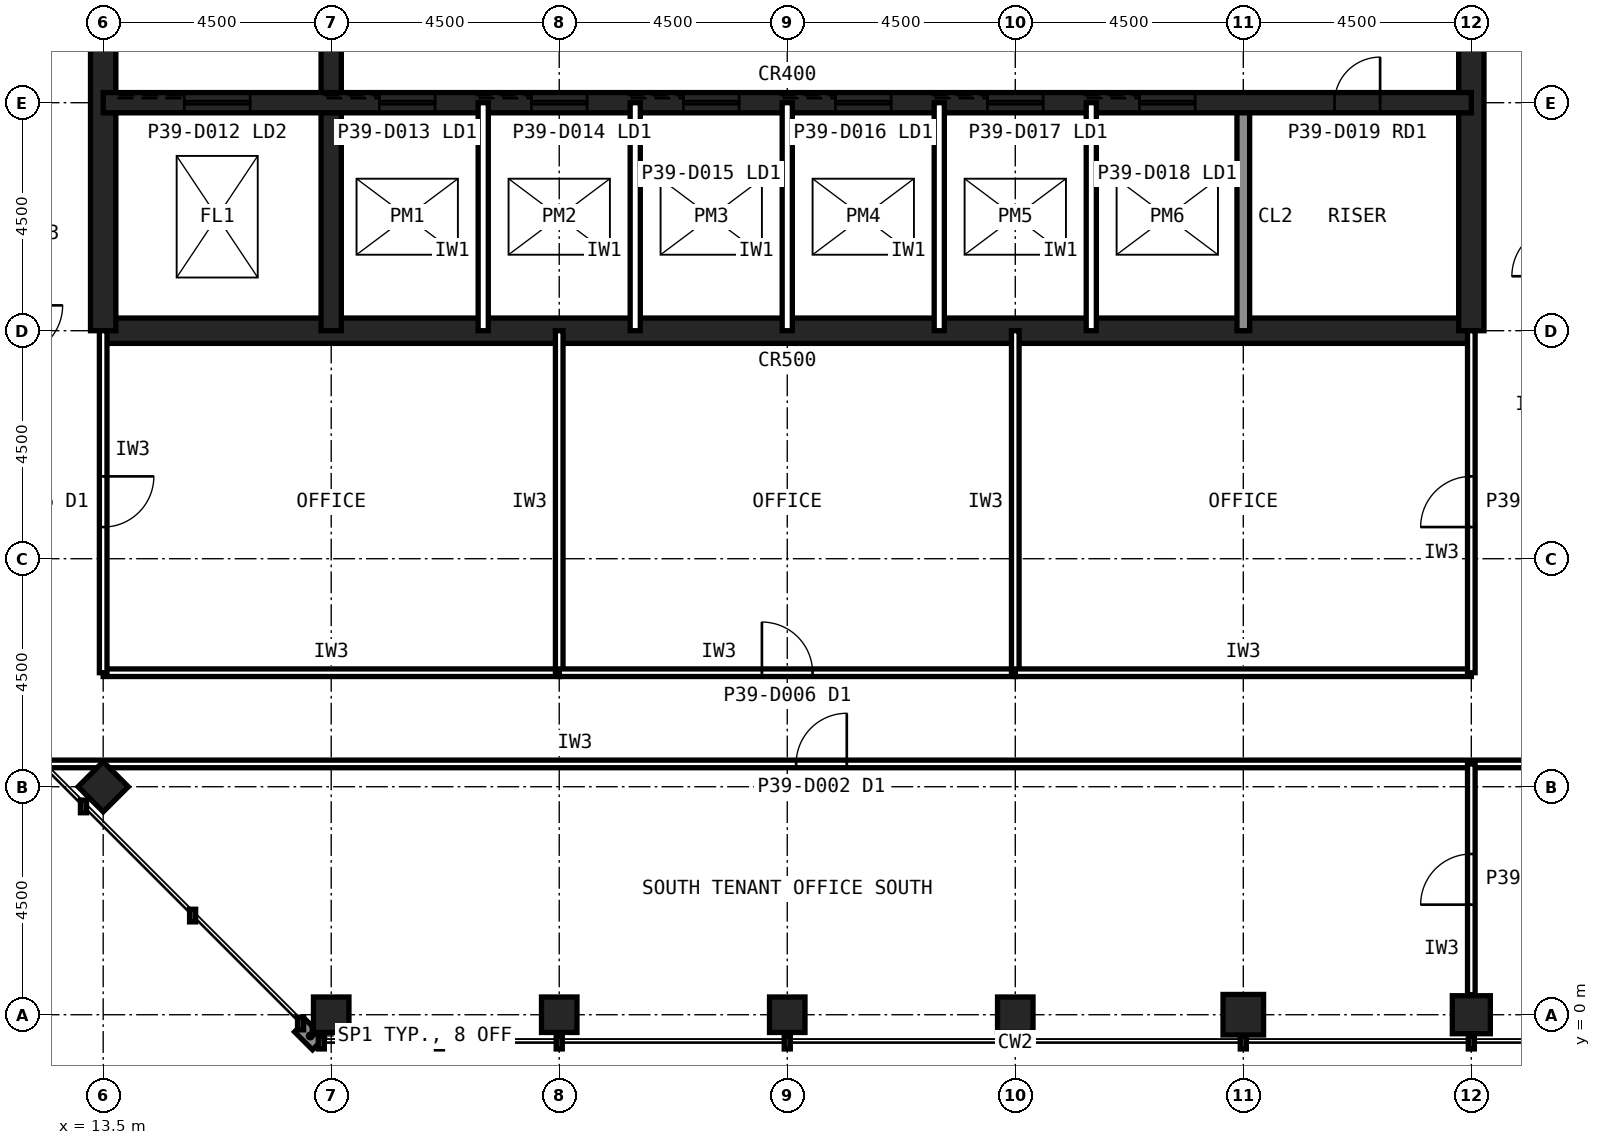
"""IFC4 building model, lengths in metres.
Left out: names, types, materials, properties, quantities, classifications, styles, units other than length and angle.
Written with IfcOpenShell. Run it as: python <this file> out.ifc"""

import sys

from ifc_helpers import new_model, si_unit, direction, frame, frame_2d, origin, origin_2d, place, context, subcontext, project, spatial, rectangle, hollow_rectangle, extrude, element, fill, save


model = new_model("IFC4")
c1 = context("Model", 3, precision=1e-05, world=origin(), true_north=direction((0.0, 1.0)))
c2 = subcontext(c1, "Body", "Model", "MODEL_VIEW")
j1 = project(units=[si_unit("LENGTHUNIT", "METRE"), si_unit("PLANEANGLEUNIT", "RADIAN")], contexts=[c1])
p1 = place(None, origin())
s1 = spatial("IfcSite", under=j1, at=p1, CompositionType="ELEMENT")
p2 = place(p1, origin())
s2 = spatial("IfcBuilding", under=s1, at=p2, CompositionType="ELEMENT")
p3 = place(p2, frame((0.0, 0.0, 167.6)))
s3 = spatial("IfcBuildingStorey", under=s2, at=p3, CompositionType="ELEMENT", Elevation=167.6)
for number, where, z_axis, x_axis in (
    (1, (18.0, 0.0, 0.0), (0.0, 0.0, 1.0), (1.0, 0.0, 0.0)),
    (2, (22.5, 0.0, 0.0), (0.0, 0.0, 1.0), (1.0, 0.0, 0.0)),
    (3, (27.0, 0.0, 0.0), (0.0, 0.0, 1.0), (1.0, 0.0, 0.0)),
    (4, (31.5, 0.0, 0.0), (0.0, 0.0, 1.0), (1.0, 0.0, 0.0)),
):
    element("IfcColumn", number, at=place(p3, frame(where, z_axis=z_axis, x_axis=x_axis)), inside=s3, PredefinedType="COLUMN", context=c2, shape_type="SweptSolid", body=[
        extrude(hollow_rectangle(XDim=0.7, YDim=0.7, WallThickness=0.036, at=origin_2d()), origin(), (0.0, 0.0, 1.0), 4.0),
    ])
p4 = place(p3, frame((36.0, 0.0, 0.0), z_axis=(0.0, 0.0, 1.0), x_axis=(1.0, 0.0, 0.0)))
e5 = element("IfcColumn", 5, at=p4, inside=s3, PredefinedType="COLUMN", context=c2, shape_type="SweptSolid", body=[
    extrude(hollow_rectangle(XDim=0.8, YDim=0.8, WallThickness=0.045, at=origin_2d()), origin(), (0.0, 0.0, 1.0), 4.0),
])
p5 = place(p3, frame((40.5, 0.0, 0.0), z_axis=(0.0, 0.0, 1.0), x_axis=(1.0, 0.0, 0.0)))
e6 = element("IfcColumn", 6, at=p5, inside=s3, PredefinedType="COLUMN", context=c2, shape_type="SweptSolid", body=[
    extrude(hollow_rectangle(XDim=0.75, YDim=0.75, WallThickness=0.04, at=origin_2d()), origin(), (0.0, 0.0, 1.0), 4.0),
])
p6 = place(p3, frame((13.5, 4.5, 0.0), z_axis=(0.0, 0.0, 1.0), x_axis=(0.707106781187, 0.707106781187, 0.0)))
e7 = element("IfcColumn", 7, at=p6, inside=s3, PredefinedType="COLUMN", context=c2, shape_type="SweptSolid", body=[
    extrude(hollow_rectangle(XDim=0.7, YDim=0.7, WallThickness=0.036, at=origin_2d()), origin(), (0.0, 0.0, 1.0), 4.0),
])
p7 = place(p3, frame((13.5, 13.5, 0.0), z_axis=(0.0, 0.0, 1.0), x_axis=(1.0, 0.0, 0.0)))
e8 = element("IfcWall", 8, at=p7, inside=s3, PredefinedType="SHEAR", context=c2, shape_type="SweptSolid", body=[
    extrude(rectangle(XDim=27.0, YDim=0.5, at=frame_2d((13.5, 0.0))), origin(), (0.0, 0.0, 1.0), 4.0),
])
p8 = place(p3, frame((40.5, 13.5, 0.0), z_axis=(0.0, 0.0, 1.0), x_axis=(0.0, 1.0, 0.0)))
e9 = element("IfcWall", 9, at=p8, inside=s3, PredefinedType="SHEAR", context=c2, shape_type="SweptSolid", body=[
    extrude(rectangle(XDim=27.0, YDim=0.5, at=frame_2d((13.5, 0.0))), origin(), (0.0, 0.0, 1.0), 4.0),
])
p9 = place(p8, frame((5.85, 0.0, 0.0)))
e10 = element("IfcOpeningElement", 10, at=p9, cuts=e9, PredefinedType="OPENING", context=c2, shape_type="SweptSolid", body=[
    extrude(rectangle(XDim=1.8, YDim=2.1, at=frame_2d((0.9, 1.05))), frame((0.0, 0.26, 0.0), z_axis=(0.0, -1.0, 0.0), x_axis=(1.0, 0.0, 0.0)), (0.0, 0.0, 1.0), 0.52),
])
p10 = place(p8, frame((19.65, 0.0, 0.0)))
e11 = element("IfcOpeningElement", 11, at=p10, cuts=e9, PredefinedType="OPENING", context=c2, shape_type="SweptSolid", body=[
    extrude(rectangle(XDim=1.2, YDim=2.1, at=frame_2d((0.6, 1.05))), frame((0.0, 0.26, 0.0), z_axis=(0.0, -1.0, 0.0), x_axis=(1.0, 0.0, 0.0)), (0.0, 0.0, 1.0), 0.52),
])
p11 = place(p3, frame((13.5, 40.5, 0.0), z_axis=(0.0, 0.0, 1.0), x_axis=(0.0, -1.0, 0.0)))
e12 = element("IfcWall", 12, at=p11, inside=s3, PredefinedType="SHEAR", context=c2, shape_type="SweptSolid", body=[
    extrude(rectangle(XDim=27.0, YDim=0.5, at=frame_2d((13.5, 0.0))), origin(), (0.0, 0.0, 1.0), 4.0),
])
p12 = place(p11, frame((19.65, 0.0, 0.0)))
e13 = element("IfcOpeningElement", 13, at=p12, cuts=e12, PredefinedType="OPENING", context=c2, shape_type="SweptSolid", body=[
    extrude(rectangle(XDim=1.2, YDim=2.1, at=frame_2d((0.6, 1.05))), frame((0.0, 0.26, 0.0), z_axis=(0.0, -1.0, 0.0), x_axis=(1.0, 0.0, 0.0)), (0.0, 0.0, 1.0), 0.52),
])
p13 = place(p11, frame((5.85, 0.0, 0.0)))
e14 = element("IfcOpeningElement", 14, at=p13, cuts=e12, PredefinedType="OPENING", context=c2, shape_type="SweptSolid", body=[
    extrude(rectangle(XDim=1.8, YDim=2.1, at=frame_2d((0.9, 1.05))), frame((0.0, 0.26, 0.0), z_axis=(0.0, -1.0, 0.0), x_axis=(1.0, 0.0, 0.0)), (0.0, 0.0, 1.0), 0.52),
])
p14 = place(p3, frame((18.0, 13.5, 0.0), z_axis=(0.0, 0.0, 1.0), x_axis=(0.0, 1.0, 0.0)))
e15 = element("IfcWall", 15, at=p14, inside=s3, PredefinedType="SHEAR", context=c2, shape_type="SweptSolid", body=[
    extrude(rectangle(XDim=18.0, YDim=0.4, at=frame_2d((9.0, 0.0))), origin(), (0.0, 0.0, 1.0), 4.0),
])
p15 = place(p3, frame((36.0, 13.5, 0.0), z_axis=(0.0, 0.0, 1.0), x_axis=(0.0, 1.0, 0.0)))
e16 = element("IfcWall", 16, at=p15, inside=s3, PredefinedType="SOLIDWALL", context=c2, shape_type="SweptSolid", body=[
    extrude(rectangle(XDim=4.5, YDim=0.25, at=frame_2d((2.25, 0.0))), origin(), (0.0, 0.0, 1.0), 3.84),
])
p16 = place(p3, frame((13.5, 18.0, 0.0), z_axis=(0.0, 0.0, 1.0), x_axis=(1.0, 0.0, 0.0)))
e17 = element("IfcWall", 17, at=p16, inside=s3, PredefinedType="SHEAR", context=c2, shape_type="SweptSolid", body=[
    extrude(rectangle(XDim=27.0, YDim=0.4, at=frame_2d((13.5, 0.0))), origin(), (0.0, 0.0, 1.0), 4.0),
])
p17 = place(p16, frame((24.3, 0.0, 0.0)))
e18 = element("IfcOpeningElement", 18, at=p17, cuts=e17, PredefinedType="OPENING", context=c2, shape_type="SweptSolid", body=[
    extrude(rectangle(XDim=0.9, YDim=2.1, at=frame_2d((0.45, 1.05))), frame((0.0, 0.21, 0.0), z_axis=(0.0, -1.0, 0.0), x_axis=(1.0, 0.0, 0.0)), (0.0, 0.0, 1.0), 0.42),
])
p18 = place(p16, frame((5.45, 0.0, 0.0)))
e19 = element("IfcOpeningElement", 19, at=p18, cuts=e17, PredefinedType="OPENING", context=c2, shape_type="SweptSolid", body=[
    extrude(rectangle(XDim=1.1, YDim=2.1, at=frame_2d((0.55, 1.05))), frame((0.0, 0.21, 0.0), z_axis=(0.0, -1.0, 0.0), x_axis=(1.0, 0.0, 0.0)), (0.0, 0.0, 1.0), 0.42),
])
p19 = place(p16, frame((8.45, 0.0, 0.0)))
e20 = element("IfcOpeningElement", 20, at=p19, cuts=e17, PredefinedType="OPENING", context=c2, shape_type="SweptSolid", body=[
    extrude(rectangle(XDim=1.1, YDim=2.1, at=frame_2d((0.55, 1.05))), frame((0.0, 0.21, 0.0), z_axis=(0.0, -1.0, 0.0), x_axis=(1.0, 0.0, 0.0)), (0.0, 0.0, 1.0), 0.42),
])
p20 = place(p16, frame((11.45, 0.0, 0.0)))
e21 = element("IfcOpeningElement", 21, at=p20, cuts=e17, PredefinedType="OPENING", context=c2, shape_type="SweptSolid", body=[
    extrude(rectangle(XDim=1.1, YDim=2.1, at=frame_2d((0.55, 1.05))), frame((0.0, 0.21, 0.0), z_axis=(0.0, -1.0, 0.0), x_axis=(1.0, 0.0, 0.0)), (0.0, 0.0, 1.0), 0.42),
])
p21 = place(p16, frame((14.45, 0.0, 0.0)))
e22 = element("IfcOpeningElement", 22, at=p21, cuts=e17, PredefinedType="OPENING", context=c2, shape_type="SweptSolid", body=[
    extrude(rectangle(XDim=1.1, YDim=2.1, at=frame_2d((0.55, 1.05))), frame((0.0, 0.21, 0.0), z_axis=(0.0, -1.0, 0.0), x_axis=(1.0, 0.0, 0.0)), (0.0, 0.0, 1.0), 0.42),
])
p22 = place(p16, frame((17.45, 0.0, 0.0)))
e23 = element("IfcOpeningElement", 23, at=p22, cuts=e17, PredefinedType="OPENING", context=c2, shape_type="SweptSolid", body=[
    extrude(rectangle(XDim=1.1, YDim=2.1, at=frame_2d((0.55, 1.05))), frame((0.0, 0.21, 0.0), z_axis=(0.0, -1.0, 0.0), x_axis=(1.0, 0.0, 0.0)), (0.0, 0.0, 1.0), 0.42),
])
p23 = place(p16, frame((20.45, 0.0, 0.0)))
e24 = element("IfcOpeningElement", 24, at=p23, cuts=e17, PredefinedType="OPENING", context=c2, shape_type="SweptSolid", body=[
    extrude(rectangle(XDim=1.1, YDim=2.1, at=frame_2d((0.55, 1.05))), frame((0.0, 0.21, 0.0), z_axis=(0.0, -1.0, 0.0), x_axis=(1.0, 0.0, 0.0)), (0.0, 0.0, 1.0), 0.42),
])
p24 = place(p16, frame((1.6, 0.0, 0.0)))
e25 = element("IfcOpeningElement", 25, at=p24, cuts=e17, PredefinedType="OPENING", context=c2, shape_type="SweptSolid", body=[
    extrude(rectangle(XDim=1.3, YDim=2.2, at=frame_2d((0.65, 1.1))), frame((0.0, 0.21, 0.0), z_axis=(0.0, -1.0, 0.0), x_axis=(1.0, 0.0, 0.0)), (0.0, 0.0, 1.0), 0.42),
])
for number, where, z_axis, x_axis in (
    (26, (21.0, 13.5, 0.0), (0.0, 0.0, 1.0), (0.0, 1.0, 0.0)),
    (27, (24.0, 13.5, 0.0), (0.0, 0.0, 1.0), (0.0, 1.0, 0.0)),
    (28, (27.0, 13.5, 0.0), (0.0, 0.0, 1.0), (0.0, 1.0, 0.0)),
    (29, (30.0, 13.5, 0.0), (0.0, 0.0, 1.0), (0.0, 1.0, 0.0)),
    (30, (33.0, 13.5, 0.0), (0.0, 0.0, 1.0), (0.0, 1.0, 0.0)),
):
    element("IfcWall", number, at=place(p3, frame(where, z_axis=z_axis, x_axis=x_axis)), inside=s3, PredefinedType="PARTITIONING", context=c2, shape_type="SweptSolid", body=[
        extrude(rectangle(XDim=4.5, YDim=0.2, at=frame_2d((2.25, 0.0))), origin(), (0.0, 0.0, 1.0), 3.84),
    ])
p25 = place(p3, frame((12.315, 4.95, 0.0), z_axis=(0.0, 0.0, 1.0), x_axis=(1.0, 0.0, 0.0)))
e31 = element("IfcWall", 31, at=p25, inside=s3, PredefinedType="PARTITIONING", context=c2, shape_type="SweptSolid", body=[
    extrude(rectangle(XDim=29.985, YDim=0.15, at=frame_2d((14.993, 0.0))), origin(), (0.0, 0.0, 1.0), 3.84),
])
p26 = place(p25, frame((14.86, 0.0, 0.0)))
e32 = element("IfcOpeningElement", 32, at=p26, cuts=e31, PredefinedType="OPENING", context=c2, shape_type="SweptSolid", body=[
    extrude(rectangle(XDim=1.0, YDim=2.1, at=frame_2d((0.5, 1.05))), frame((0.0, 0.085, 0.0), z_axis=(0.0, -1.0, 0.0), x_axis=(1.0, 0.0, 0.0)), (0.0, 0.0, 1.0), 0.17),
])
p27 = place(p3, frame((13.5, 6.75, 0.0), z_axis=(0.0, 0.0, 1.0), x_axis=(1.0, 0.0, 0.0)))
e33 = element("IfcWall", 33, at=p27, inside=s3, PredefinedType="PARTITIONING", context=c2, shape_type="SweptSolid", body=[
    extrude(rectangle(XDim=9.0, YDim=0.15, at=frame_2d((4.5, 0.0))), origin(), (0.0, 0.0, 1.0), 3.84),
])
p28 = place(p3, frame((22.5, 6.75, 0.0), z_axis=(0.0, 0.0, 1.0), x_axis=(0.0, 1.0, 0.0)))
e34 = element("IfcWall", 34, at=p28, inside=s3, PredefinedType="PARTITIONING", context=c2, shape_type="SweptSolid", body=[
    extrude(rectangle(XDim=6.75, YDim=0.15, at=frame_2d((3.375, 0.0))), origin(), (0.0, 0.0, 1.0), 2.989),
])
p29 = place(p3, frame((13.5, 13.5, 0.0), z_axis=(0.0, 0.0, 1.0), x_axis=(0.0, -1.0, 0.0)))
e35 = element("IfcWall", 35, at=p29, inside=s3, PredefinedType="PARTITIONING", context=c2, shape_type="SweptSolid", body=[
    extrude(rectangle(XDim=6.75, YDim=0.15, at=frame_2d((3.375, 0.0))), origin(), (0.0, 0.0, 1.0), 2.989),
])
p30 = place(p29, frame((2.875, 0.0, 0.0)))
e36 = element("IfcOpeningElement", 36, at=p30, cuts=e35, PredefinedType="OPENING", context=c2, shape_type="SweptSolid", body=[
    extrude(rectangle(XDim=1.0, YDim=2.1, at=frame_2d((0.5, 1.05))), frame((0.0, 0.085, 0.0), z_axis=(0.0, -1.0, 0.0), x_axis=(1.0, 0.0, 0.0)), (0.0, 0.0, 1.0), 0.17),
])
p31 = place(p3, frame((22.5, 6.75, 0.0), z_axis=(0.0, 0.0, 1.0), x_axis=(1.0, 0.0, 0.0)))
e37 = element("IfcWall", 37, at=p31, inside=s3, PredefinedType="PARTITIONING", context=c2, shape_type="SweptSolid", body=[
    extrude(rectangle(XDim=9.0, YDim=0.15, at=frame_2d((4.5, 0.0))), origin(), (0.0, 0.0, 1.0), 3.84),
])
p32 = place(p31, frame((4.0, 0.0, 0.0)))
e38 = element("IfcOpeningElement", 38, at=p32, cuts=e37, PredefinedType="OPENING", context=c2, shape_type="SweptSolid", body=[
    extrude(rectangle(XDim=1.0, YDim=2.1, at=frame_2d((0.5, 1.05))), frame((0.0, 0.085, 0.0), z_axis=(0.0, -1.0, 0.0), x_axis=(1.0, 0.0, 0.0)), (0.0, 0.0, 1.0), 0.17),
])
p33 = place(p3, frame((31.5, 6.75, 0.0), z_axis=(0.0, 0.0, 1.0), x_axis=(0.0, 1.0, 0.0)))
e39 = element("IfcWall", 39, at=p33, inside=s3, PredefinedType="PARTITIONING", context=c2, shape_type="SweptSolid", body=[
    extrude(rectangle(XDim=6.75, YDim=0.15, at=frame_2d((3.375, 0.0))), origin(), (0.0, 0.0, 1.0), 2.989),
])
p34 = place(p3, frame((31.5, 6.75, 0.0), z_axis=(0.0, 0.0, 1.0), x_axis=(1.0, 0.0, 0.0)))
e40 = element("IfcWall", 40, at=p34, inside=s3, PredefinedType="PARTITIONING", context=c2, shape_type="SweptSolid", body=[
    extrude(rectangle(XDim=9.0, YDim=0.15, at=frame_2d((4.5, 0.0))), origin(), (0.0, 0.0, 1.0), 3.84),
])
p35 = place(p3, frame((40.5, 6.75, 0.0), z_axis=(0.0, 0.0, 1.0), x_axis=(0.0, 1.0, 0.0)))
e41 = element("IfcWall", 41, at=p35, inside=s3, PredefinedType="PARTITIONING", context=c2, shape_type="SweptSolid", body=[
    extrude(rectangle(XDim=6.75, YDim=0.15, at=frame_2d((3.375, 0.0))), origin(), (0.0, 0.0, 1.0), 2.989),
])
p36 = place(p35, frame((2.875, 0.0, 0.0)))
e42 = element("IfcOpeningElement", 42, at=p36, cuts=e41, PredefinedType="OPENING", context=c2, shape_type="SweptSolid", body=[
    extrude(rectangle(XDim=1.0, YDim=2.1, at=frame_2d((0.5, 1.05))), frame((0.0, 0.085, 0.0), z_axis=(0.0, -1.0, 0.0), x_axis=(1.0, 0.0, 0.0)), (0.0, 0.0, 1.0), 0.17),
])
p37 = place(p3, frame((40.5, 0.395, 0.0), z_axis=(0.0, 0.0, 1.0), x_axis=(0.0, 1.0, 0.0)))
e43 = element("IfcWall", 43, at=p37, inside=s3, PredefinedType="PARTITIONING", context=c2, shape_type="SweptSolid", body=[
    extrude(rectangle(XDim=4.555, YDim=0.15, at=frame_2d((2.277, 0.0))), origin(), (0.0, 0.0, 1.0), 2.989),
])
p38 = place(p37, frame((1.778, 0.0, 0.0)))
e44 = element("IfcOpeningElement", 44, at=p38, cuts=e43, PredefinedType="OPENING", context=c2, shape_type="SweptSolid", body=[
    extrude(rectangle(XDim=1.0, YDim=2.1, at=frame_2d((0.5, 1.05))), frame((0.0, 0.085, 0.0), z_axis=(0.0, -1.0, 0.0), x_axis=(1.0, 0.0, 0.0)), (0.0, 0.0, 1.0), 0.17),
])
p39 = place(p17, origin())
e45 = element("IfcDoor", 45, at=p39, inside=s3, OperationType="SINGLE_SWING_RIGHT", PredefinedType="DOOR", context=c2, shape_type="SweptSolid", body=[
    extrude(rectangle(XDim=0.9, YDim=2.1, at=frame_2d((0.45, 1.05))), frame((0.0, 0.025, 0.0), z_axis=(0.0, -1.0, 0.0), x_axis=(1.0, 0.0, 0.0)), (0.0, 0.0, 1.0), 0.05),
])
fill(e18, e45)
p40 = place(p18, origin())
e46 = element("IfcDoor", 46, at=p40, inside=s3, OperationType="SLIDING_TO_LEFT", PredefinedType="DOOR", context=c2, shape_type="SweptSolid", body=[
    extrude(rectangle(XDim=1.1, YDim=2.1, at=frame_2d((0.55, 1.05))), frame((0.0, 0.025, 0.0), z_axis=(0.0, -1.0, 0.0), x_axis=(1.0, 0.0, 0.0)), (0.0, 0.0, 1.0), 0.05),
])
fill(e19, e46)
p41 = place(p19, origin())
e47 = element("IfcDoor", 47, at=p41, inside=s3, OperationType="SLIDING_TO_LEFT", PredefinedType="DOOR", context=c2, shape_type="SweptSolid", body=[
    extrude(rectangle(XDim=1.1, YDim=2.1, at=frame_2d((0.55, 1.05))), frame((0.0, 0.025, 0.0), z_axis=(0.0, -1.0, 0.0), x_axis=(1.0, 0.0, 0.0)), (0.0, 0.0, 1.0), 0.05),
])
fill(e20, e47)
p42 = place(p20, origin())
e48 = element("IfcDoor", 48, at=p42, inside=s3, OperationType="SLIDING_TO_LEFT", PredefinedType="DOOR", context=c2, shape_type="SweptSolid", body=[
    extrude(rectangle(XDim=1.1, YDim=2.1, at=frame_2d((0.55, 1.05))), frame((0.0, 0.025, 0.0), z_axis=(0.0, -1.0, 0.0), x_axis=(1.0, 0.0, 0.0)), (0.0, 0.0, 1.0), 0.05),
])
fill(e21, e48)
p43 = place(p21, origin())
e49 = element("IfcDoor", 49, at=p43, inside=s3, OperationType="SLIDING_TO_LEFT", PredefinedType="DOOR", context=c2, shape_type="SweptSolid", body=[
    extrude(rectangle(XDim=1.1, YDim=2.1, at=frame_2d((0.55, 1.05))), frame((0.0, 0.025, 0.0), z_axis=(0.0, -1.0, 0.0), x_axis=(1.0, 0.0, 0.0)), (0.0, 0.0, 1.0), 0.05),
])
fill(e22, e49)
p44 = place(p22, origin())
e50 = element("IfcDoor", 50, at=p44, inside=s3, OperationType="SLIDING_TO_LEFT", PredefinedType="DOOR", context=c2, shape_type="SweptSolid", body=[
    extrude(rectangle(XDim=1.1, YDim=2.1, at=frame_2d((0.55, 1.05))), frame((0.0, 0.025, 0.0), z_axis=(0.0, -1.0, 0.0), x_axis=(1.0, 0.0, 0.0)), (0.0, 0.0, 1.0), 0.05),
])
fill(e23, e50)
p45 = place(p23, origin())
e51 = element("IfcDoor", 51, at=p45, inside=s3, OperationType="SLIDING_TO_LEFT", PredefinedType="DOOR", context=c2, shape_type="SweptSolid", body=[
    extrude(rectangle(XDim=1.1, YDim=2.1, at=frame_2d((0.55, 1.05))), frame((0.0, 0.025, 0.0), z_axis=(0.0, -1.0, 0.0), x_axis=(1.0, 0.0, 0.0)), (0.0, 0.0, 1.0), 0.05),
])
fill(e24, e51)
p46 = place(p24, origin())
e52 = element("IfcDoor", 52, at=p46, inside=s3, OperationType="SLIDING_TO_LEFT", PredefinedType="DOOR", context=c2, shape_type="SweptSolid", body=[
    extrude(rectangle(XDim=1.3, YDim=2.2, at=frame_2d((0.65, 1.1))), frame((0.0, 0.025, 0.0), z_axis=(0.0, -1.0, 0.0), x_axis=(1.0, 0.0, 0.0)), (0.0, 0.0, 1.0), 0.05),
])
fill(e25, e52)
p47 = place(p26, origin())
e53 = element("IfcDoor", 53, at=p47, inside=s3, OperationType="SINGLE_SWING_RIGHT", PredefinedType="DOOR", context=c2, shape_type="SweptSolid", body=[
    extrude(rectangle(XDim=1.0, YDim=2.1, at=frame_2d((0.5, 1.05))), frame((0.0, 0.025, 0.0), z_axis=(0.0, -1.0, 0.0), x_axis=(1.0, 0.0, 0.0)), (0.0, 0.0, 1.0), 0.05),
])
fill(e32, e53)
p48 = place(p30, origin())
e54 = element("IfcDoor", 54, at=p48, inside=s3, OperationType="SINGLE_SWING_LEFT", PredefinedType="DOOR", context=c2, shape_type="SweptSolid", body=[
    extrude(rectangle(XDim=1.0, YDim=2.1, at=frame_2d((0.5, 1.05))), frame((0.0, 0.025, 0.0), z_axis=(0.0, -1.0, 0.0), x_axis=(1.0, 0.0, 0.0)), (0.0, 0.0, 1.0), 0.05),
])
fill(e36, e54)
p49 = place(p32, origin())
e55 = element("IfcDoor", 55, at=p49, inside=s3, OperationType="SINGLE_SWING_LEFT", PredefinedType="DOOR", context=c2, shape_type="SweptSolid", body=[
    extrude(rectangle(XDim=1.0, YDim=2.1, at=frame_2d((0.5, 1.05))), frame((0.0, 0.025, 0.0), z_axis=(0.0, -1.0, 0.0), x_axis=(1.0, 0.0, 0.0)), (0.0, 0.0, 1.0), 0.05),
])
fill(e38, e55)
p50 = place(p36, origin())
e56 = element("IfcDoor", 56, at=p50, inside=s3, OperationType="SINGLE_SWING_LEFT", PredefinedType="DOOR", context=c2, shape_type="SweptSolid", body=[
    extrude(rectangle(XDim=1.0, YDim=2.1, at=frame_2d((0.5, 1.05))), frame((0.0, 0.025, 0.0), z_axis=(0.0, -1.0, 0.0), x_axis=(1.0, 0.0, 0.0)), (0.0, 0.0, 1.0), 0.05),
])
fill(e42, e56)
p51 = place(p38, origin())
e57 = element("IfcDoor", 57, at=p51, inside=s3, OperationType="SINGLE_SWING_LEFT", PredefinedType="DOOR", context=c2, shape_type="SweptSolid", body=[
    extrude(rectangle(XDim=1.0, YDim=2.1, at=frame_2d((0.5, 1.05))), frame((0.0, 0.025, 0.0), z_axis=(0.0, -1.0, 0.0), x_axis=(1.0, 0.0, 0.0)), (0.0, 0.0, 1.0), 0.05),
])
fill(e44, e57)
save(model, sys.argv[1])
